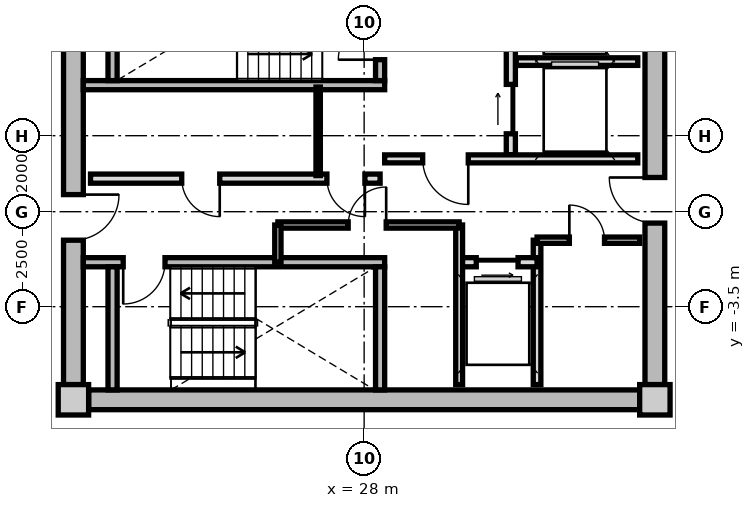
"""IFC4 building model, lengths in metres.
Left out: names, types, materials, properties, quantities, classifications, styles, units other than length and angle.
Written with IfcOpenShell. Run it as: python <this file> out.ifc"""

import sys

from ifc_helpers import new_model, si_unit, direction, frame, frame_2d, origin, origin_2d, place, context, subcontext, project, spatial, rectangle, extrude, source, transform, mapped, element, fill, save


model = new_model("IFC4")
c1 = context("Model", 3, precision=1e-05, world=origin(), true_north=direction((0.0, 1.0)))
c2 = subcontext(c1, "Body", "Model", "MODEL_VIEW")
j1 = project(units=[si_unit("LENGTHUNIT", "METRE"), si_unit("PLANEANGLEUNIT", "RADIAN")], contexts=[c1])
p1 = place(None, origin())
s1 = spatial("IfcSite", under=j1, at=p1, CompositionType="ELEMENT")
p2 = place(p1, origin())
s2 = spatial("IfcBuilding", under=s1, at=p2, CompositionType="ELEMENT")
p3 = place(p2, frame((0.0, 0.0, 196.75)))
s3 = spatial("IfcBuildingStorey", under=s2, at=p3, CompositionType="ELEMENT", Elevation=196.75)
m1 = source(origin(), c2, "Body", "SweptSolid", [
    extrude(rectangle(XDim=0.8, YDim=0.8, at=origin_2d()), origin(), (0.0, 0.0, 1.0), 3.05),
])
for number, where, z_axis, x_axis in (
    (1, (20.35, -5.95, 0.0), (0.0, 0.0, 1.0), (1.0, 0.0, 0.0)),
    (2, (35.65, -5.95, 0.0), (0.0, 0.0, 1.0), (1.0, 0.0, 0.0)),
):
    element("IfcColumn", number, at=place(p3, frame(where, z_axis=z_axis, x_axis=x_axis)), inside=s3, PredefinedType="COLUMN", context=c2, shape_type="MappedRepresentation", body=[
        mapped(m1, transform((0.0, 0.0, 0.0), x_axis=(1.0, 0.0, 0.0), y_axis=(0.0, 1.0, 0.0), z_axis=(0.0, 0.0, 1.0), scale=1.0)),
    ])
m2 = source(origin(), c2, "Body", "SweptSolid", [
    extrude(rectangle(XDim=14.5, YDim=0.52, at=frame_2d((7.25, 0.0))), origin(), (0.0, 0.0, 1.0), 2.76),
])
p4 = place(p3, frame((35.25, -5.95, 0.0), z_axis=(0.0, 0.0, 1.0), x_axis=(-1.0, 0.0, 0.0)))
e3 = element("IfcWall", 3, at=p4, inside=s3, PredefinedType="SHEAR", context=c2, shape_type="MappedRepresentation", body=[
    mapped(m2, transform((0.0, 0.0, 0.0), x_axis=(1.0, 0.0, 0.0), y_axis=(0.0, 1.0, 0.0), z_axis=(0.0, 0.0, 1.0), scale=1.0)),
])
m3 = source(origin(), c2, "Body", "SweptSolid", [
    extrude(rectangle(XDim=11.1, YDim=0.52, at=frame_2d((5.55, 0.0))), origin(), (0.0, 0.0, 1.0), 2.76),
])
p5 = place(p3, frame((20.35, -5.55, 0.0), z_axis=(0.0, 0.0, 1.0), x_axis=(0.0, 1.0, 0.0)))
e4 = element("IfcWall", 4, at=p5, inside=s3, PredefinedType="SHEAR", context=c2, shape_type="MappedRepresentation", body=[
    mapped(m3, transform((0.0, 0.0, 0.0), x_axis=(1.0, 0.0, 0.0), y_axis=(0.0, 1.0, 0.0), z_axis=(0.0, 0.0, 1.0), scale=1.0)),
])
p6 = place(p5, frame((3.8, 0.0, 0.0)))
e5 = element("IfcOpeningElement", 5, at=p6, cuts=e4, PredefinedType="OPENING", context=c2, shape_type="SweptSolid", body=[
    extrude(rectangle(XDim=1.2, YDim=2.15, at=frame_2d((0.6, 1.075))), frame((0.0, 0.27, 0.0), z_axis=(0.0, -1.0, 0.0), x_axis=(1.0, 0.0, 0.0)), (0.0, 0.0, 1.0), 0.54),
])
p7 = place(p3, frame((35.65, 5.55, 0.0), z_axis=(0.0, 0.0, 1.0), x_axis=(0.0, -1.0, 0.0)))
e6 = element("IfcWall", 6, at=p7, inside=s3, PredefinedType="SHEAR", context=c2, shape_type="MappedRepresentation", body=[
    mapped(m3, transform((0.0, 0.0, 0.0), x_axis=(1.0, 0.0, 0.0), y_axis=(0.0, 1.0, 0.0), z_axis=(0.0, 0.0, 1.0), scale=1.0)),
])
p8 = place(p7, frame((5.65, 0.0, 0.0)))
e7 = element("IfcOpeningElement", 7, at=p8, cuts=e6, PredefinedType="OPENING", context=c2, shape_type="SweptSolid", body=[
    extrude(rectangle(XDim=1.2, YDim=2.15, at=frame_2d((0.6, 1.075))), frame((0.0, 0.27, 0.0), z_axis=(0.0, -1.0, 0.0), x_axis=(1.0, 0.0, 0.0)), (0.0, 0.0, 1.0), 0.54),
])
m4 = source(origin(), c2, "Body", "SweptSolid", [
    extrude(rectangle(XDim=7.93, YDim=0.24, at=frame_2d((3.965, 0.0))), origin(), (0.0, 0.0, 1.0), 2.76),
])
p9 = place(p3, frame((20.61, 2.33, 0.0), z_axis=(0.0, 0.0, 1.0), x_axis=(1.0, 0.0, 0.0)))
e8 = element("IfcWall", 8, at=p9, inside=s3, PredefinedType="PARTITIONING", context=c2, shape_type="MappedRepresentation", body=[
    mapped(m4, transform((0.0, 0.0, 0.0), x_axis=(1.0, 0.0, 0.0), y_axis=(0.0, 1.0, 0.0), z_axis=(0.0, 0.0, 1.0), scale=1.0)),
])
m5 = source(origin(), c2, "Body", "SweptSolid", [
    extrude(rectangle(XDim=3.24, YDim=0.24, at=frame_2d((1.62, 0.0))), origin(), (0.0, 0.0, 1.0), 2.76),
])
p10 = place(p3, frame((21.38, 2.45, 0.0), z_axis=(0.0, 0.0, 1.0), x_axis=(0.0, 1.0, 0.0)))
e9 = element("IfcWall", 9, at=p10, inside=s3, PredefinedType="PARTITIONING", context=c2, shape_type="MappedRepresentation", body=[
    mapped(m5, transform((0.0, 0.0, 0.0), x_axis=(1.0, 0.0, 0.0), y_axis=(0.0, 1.0, 0.0), z_axis=(0.0, 0.0, 1.0), scale=1.0)),
])
p11 = place(p3, frame((28.42, 2.45, 0.0), z_axis=(0.0, 0.0, 1.0), x_axis=(0.0, 1.0, 0.0)))
e10 = element("IfcWall", 10, at=p11, inside=s3, PredefinedType="PARTITIONING", context=c2, shape_type="MappedRepresentation", body=[
    mapped(m5, transform((0.0, 0.0, 0.0), x_axis=(1.0, 0.0, 0.0), y_axis=(0.0, 1.0, 0.0), z_axis=(0.0, 0.0, 1.0), scale=1.0)),
])
p12 = place(p11, frame((0.55, 0.0, 0.0)))
e11 = element("IfcOpeningElement", 11, at=p12, cuts=e10, PredefinedType="OPENING", context=c2, shape_type="SweptSolid", body=[
    extrude(rectangle(XDim=1.1, YDim=2.15, at=frame_2d((0.55, 1.075))), frame((0.0, 0.13, 0.0), z_axis=(0.0, -1.0, 0.0), x_axis=(1.0, 0.0, 0.0)), (0.0, 0.0, 1.0), 0.26),
])
p13 = place(p3, frame((20.61, -2.33, 0.0), z_axis=(0.0, 0.0, 1.0), x_axis=(1.0, 0.0, 0.0)))
e12 = element("IfcWall", 12, at=p13, inside=s3, PredefinedType="PARTITIONING", context=c2, shape_type="MappedRepresentation", body=[
    mapped(m4, transform((0.0, 0.0, 0.0), x_axis=(1.0, 0.0, 0.0), y_axis=(0.0, 1.0, 0.0), z_axis=(0.0, 0.0, 1.0), scale=1.0)),
])
p14 = place(p13, frame((1.05, 0.0, 0.0)))
e13 = element("IfcOpeningElement", 13, at=p14, cuts=e12, PredefinedType="OPENING", context=c2, shape_type="SweptSolid", body=[
    extrude(rectangle(XDim=1.1, YDim=2.15, at=frame_2d((0.55, 1.075))), frame((0.0, 0.13, 0.0), z_axis=(0.0, -1.0, 0.0), x_axis=(1.0, 0.0, 0.0)), (0.0, 0.0, 1.0), 0.26),
])
for number, where, z_axis, x_axis in (
    (14, (21.38, -5.69, 0.0), (0.0, 0.0, 1.0), (0.0, 1.0, 0.0)),
    (15, (28.42, -5.69, 0.0), (0.0, 0.0, 1.0), (0.0, 1.0, 0.0)),
):
    element("IfcWall", number, at=place(p3, frame(where, z_axis=z_axis, x_axis=x_axis)), inside=s3, PredefinedType="PARTITIONING", context=c2, shape_type="MappedRepresentation", body=[
        mapped(m5, transform((0.0, 0.0, 0.0), x_axis=(1.0, 0.0, 0.0), y_axis=(0.0, 1.0, 0.0), z_axis=(0.0, 0.0, 1.0), scale=1.0)),
    ])
m6 = source(origin(), c2, "Body", "SweptSolid", [
    extrude(rectangle(XDim=5.0, YDim=0.24, at=frame_2d((2.5, 0.0))), origin(), (0.0, 0.0, 1.0), 2.745),
])
p15 = place(p3, frame((31.86, 0.5, 0.0), z_axis=(0.0, 0.0, 1.0), x_axis=(0.0, 1.0, 0.0)))
e16 = element("IfcWall", 16, at=p15, inside=s3, PredefinedType="PARTITIONING", context=c2, shape_type="MappedRepresentation", body=[
    mapped(m6, transform((0.0, 0.0, 0.0), x_axis=(1.0, 0.0, 0.0), y_axis=(0.0, 1.0, 0.0), z_axis=(0.0, 0.0, 1.0), scale=1.0)),
])
p16 = place(p15, frame((3.05, 0.0, 0.0)))
e17 = element("IfcOpeningElement", 17, at=p16, cuts=e16, PredefinedType="OPENING", context=c2, shape_type="SweptSolid", body=[
    extrude(rectangle(XDim=1.3, YDim=2.2, at=frame_2d((0.65, 1.1))), frame((0.0, 0.13, 0.0), z_axis=(0.0, -1.0, 0.0), x_axis=(1.0, 0.0, 0.0)), (0.0, 0.0, 1.0), 0.26),
])
p17 = place(p15, frame((0.55, 0.0, 0.0)))
e18 = element("IfcOpeningElement", 18, at=p17, cuts=e16, PredefinedType="OPENING", context=c2, shape_type="SweptSolid", body=[
    extrude(rectangle(XDim=1.3, YDim=2.2, at=frame_2d((0.65, 1.1))), frame((0.0, 0.13, 0.0), z_axis=(0.0, -1.0, 0.0), x_axis=(1.0, 0.0, 0.0)), (0.0, 0.0, 1.0), 0.26),
])
m7 = source(origin(), c2, "Body", "SweptSolid", [
    extrude(rectangle(XDim=3.2, YDim=0.2, at=frame_2d((1.6, 0.0))), origin(), (0.0, 0.0, 1.0), 2.745),
])
p18 = place(p3, frame((32.0, 2.95, 0.0), z_axis=(0.0, 0.0, 1.0), x_axis=(1.0, 0.0, 0.0)))
e19 = element("IfcWall", 19, at=p18, inside=s3, PredefinedType="PARTITIONING", context=c2, shape_type="MappedRepresentation", body=[
    mapped(m7, transform((0.0, 0.0, 0.0), x_axis=(1.0, 0.0, 0.0), y_axis=(0.0, 1.0, 0.0), z_axis=(0.0, 0.0, 1.0), scale=1.0)),
])
m8 = source(origin(), c2, "Body", "SweptSolid", [
    extrude(rectangle(XDim=6.66, YDim=0.21, at=frame_2d((3.33, 0.0))), origin(), (0.0, 0.0, 1.0), 2.745),
])
p19 = place(p3, frame((28.54, 0.39, 0.0), z_axis=(0.0, 0.0, 1.0), x_axis=(1.0, 0.0, 0.0)))
e20 = element("IfcWall", 20, at=p19, inside=s3, PredefinedType="PARTITIONING", context=c2, shape_type="MappedRepresentation", body=[
    mapped(m8, transform((0.0, 0.0, 0.0), x_axis=(1.0, 0.0, 0.0), y_axis=(0.0, 1.0, 0.0), z_axis=(0.0, 0.0, 1.0), scale=1.0)),
])
p20 = place(p19, frame((1.0, 0.0, 0.0)))
e21 = element("IfcOpeningElement", 21, at=p20, cuts=e20, PredefinedType="OPENING", context=c2, shape_type="SweptSolid", body=[
    extrude(rectangle(XDim=1.2, YDim=2.15, at=frame_2d((0.6, 1.075))), frame((0.0, 0.115, 0.0), z_axis=(0.0, -1.0, 0.0), x_axis=(1.0, 0.0, 0.0)), (0.0, 0.0, 1.0), 0.23),
])
m9 = source(origin(), c2, "Body", "SweptSolid", [
    extrude(rectangle(XDim=7.62, YDim=0.24, at=frame_2d((3.81, 0.0))), origin(), (0.0, 0.0, 1.0), 2.745),
])
p21 = place(p3, frame((20.8, -0.13, 0.0), z_axis=(0.0, 0.0, 1.0), x_axis=(1.0, 0.0, 0.0)))
e22 = element("IfcWall", 22, at=p21, inside=s3, PredefinedType="PARTITIONING", context=c2, shape_type="MappedRepresentation", body=[
    mapped(m9, transform((0.0, 0.0, 0.0), x_axis=(1.0, 0.0, 0.0), y_axis=(0.0, 1.0, 0.0), z_axis=(0.0, 0.0, 1.0), scale=1.0)),
])
p22 = place(p21, frame((6.22, 0.0, 0.0)))
e23 = element("IfcOpeningElement", 23, at=p22, cuts=e22, PredefinedType="OPENING", context=c2, shape_type="SweptSolid", body=[
    extrude(rectangle(XDim=1.0, YDim=2.1, at=frame_2d((0.5, 1.05))), frame((0.0, 0.13, 0.0), z_axis=(0.0, -1.0, 0.0), x_axis=(1.0, 0.0, 0.0)), (0.0, 0.0, 1.0), 0.26),
])
p23 = place(p21, frame((2.4, 0.0, 0.0)))
e24 = element("IfcOpeningElement", 24, at=p23, cuts=e22, PredefinedType="OPENING", context=c2, shape_type="SweptSolid", body=[
    extrude(rectangle(XDim=1.0, YDim=2.1, at=frame_2d((0.5, 1.05))), frame((0.0, 0.13, 0.0), z_axis=(0.0, -1.0, 0.0), x_axis=(1.0, 0.0, 0.0)), (0.0, 0.0, 1.0), 0.26),
])
m10 = source(origin(), c2, "Body", "SweptSolid", [
    extrude(rectangle(XDim=2.33, YDim=0.115, at=frame_2d((1.165, 0.0))), origin(), (0.0, 0.0, 1.0), 2.745),
])
p24 = place(p3, frame((26.79, -0.05, 0.0), z_axis=(0.0, 0.0, 1.0), x_axis=(0.0, 1.0, 0.0)))
e25 = element("IfcWall", 25, at=p24, inside=s3, PredefinedType="PARTITIONING", context=c2, shape_type="MappedRepresentation", body=[
    mapped(m10, transform((0.0, 0.0, 0.0), x_axis=(1.0, 0.0, 0.0), y_axis=(0.0, 1.0, 0.0), z_axis=(0.0, 0.0, 1.0), scale=1.0)),
])
m11 = source(origin(), c2, "Body", "SweptSolid", [
    extrude(rectangle(XDim=3.8, YDim=0.2, at=frame_2d((1.9, 0.0))), origin(), (0.0, 0.0, 1.0), 2.745),
])
p25 = place(p3, frame((32.55, -5.55, 0.0), z_axis=(0.0, 0.0, 1.0), x_axis=(0.0, 1.0, 0.0)))
e26 = element("IfcWall", 26, at=p25, inside=s3, PredefinedType="PARTITIONING", context=c2, shape_type="MappedRepresentation", body=[
    mapped(m11, transform((0.0, 0.0, 0.0), x_axis=(1.0, 0.0, 0.0), y_axis=(0.0, 1.0, 0.0), z_axis=(0.0, 0.0, 1.0), scale=1.0)),
])
m12 = source(origin(), c2, "Body", "SweptSolid", [
    extrude(rectangle(XDim=2.05, YDim=0.24, at=frame_2d((1.025, 0.0))), origin(), (0.0, 0.0, 1.0), 2.745),
])
p26 = place(p3, frame((30.5, -2.33, 0.0), z_axis=(0.0, 0.0, 1.0), x_axis=(1.0, 0.0, 0.0)))
e27 = element("IfcWall", 27, at=p26, inside=s3, PredefinedType="PARTITIONING", context=c2, shape_type="MappedRepresentation", body=[
    mapped(m12, transform((0.0, 0.0, 0.0), x_axis=(1.0, 0.0, 0.0), y_axis=(0.0, 1.0, 0.0), z_axis=(0.0, 0.0, 1.0), scale=1.0)),
])
p27 = place(p26, frame((0.45, 0.0, 0.0)))
e28 = element("IfcOpeningElement", 28, at=p27, cuts=e27, PredefinedType="OPENING", context=c2, shape_type="SweptSolid", body=[
    extrude(rectangle(XDim=1.1, YDim=2.2, at=frame_2d((0.55, 1.1))), frame((0.0, 0.13, 0.0), z_axis=(0.0, -1.0, 0.0), x_axis=(1.0, 0.0, 0.0)), (0.0, 0.0, 1.0), 0.26),
])
m13 = source(origin(), c2, "Body", "SweptSolid", [
    extrude(rectangle(XDim=4.2, YDim=0.18, at=frame_2d((2.1, 0.0))), origin(), (0.0, 0.0, 1.0), 2.745),
])
p28 = place(p3, frame((30.5, -5.55, 0.0), z_axis=(0.0, 0.0, 1.0), x_axis=(0.0, 1.0, 0.0)))
e29 = element("IfcWall", 29, at=p28, inside=s3, PredefinedType="PARTITIONING", context=c2, shape_type="MappedRepresentation", body=[
    mapped(m13, transform((0.0, 0.0, 0.0), x_axis=(1.0, 0.0, 0.0), y_axis=(0.0, 1.0, 0.0), z_axis=(0.0, 0.0, 1.0), scale=1.0)),
])
m14 = source(origin(), c2, "Body", "SweptSolid", [
    extrude(rectangle(XDim=4.77, YDim=0.165, at=frame_2d((2.385, 0.0))), origin(), (0.0, 0.0, 1.0), 2.745),
])
p29 = place(p3, frame((25.73, -1.35, 0.0), z_axis=(0.0, 0.0, 1.0), x_axis=(1.0, 0.0, 0.0)))
e30 = element("IfcWall", 30, at=p29, inside=s3, PredefinedType="PARTITIONING", context=c2, shape_type="MappedRepresentation", body=[
    mapped(m14, transform((0.0, 0.0, 0.0), x_axis=(1.0, 0.0, 0.0), y_axis=(0.0, 1.0, 0.0), z_axis=(0.0, 0.0, 1.0), scale=1.0)),
])
p30 = place(p29, frame((1.85, 0.0, 0.0)))
e31 = element("IfcOpeningElement", 31, at=p30, cuts=e30, PredefinedType="OPENING", context=c2, shape_type="SweptSolid", body=[
    extrude(rectangle(XDim=1.0, YDim=2.1, at=frame_2d((0.5, 1.05))), frame((0.0, 0.093, 0.0), z_axis=(0.0, -1.0, 0.0), x_axis=(1.0, 0.0, 0.0)), (0.0, 0.0, 1.0), 0.185),
])
m15 = source(origin(), c2, "Body", "SweptSolid", [
    extrude(rectangle(XDim=0.98, YDim=0.165, at=frame_2d((0.49, 0.0))), origin(), (0.0, 0.0, 1.0), 2.745),
])
p31 = place(p3, frame((25.73, -2.33, 0.0), z_axis=(0.0, 0.0, 1.0), x_axis=(0.0, 1.0, 0.0)))
e32 = element("IfcWall", 32, at=p31, inside=s3, PredefinedType="PARTITIONING", context=c2, shape_type="MappedRepresentation", body=[
    mapped(m15, transform((0.0, 0.0, 0.0), x_axis=(1.0, 0.0, 0.0), y_axis=(0.0, 1.0, 0.0), z_axis=(0.0, 0.0, 1.0), scale=1.0)),
])
m16 = source(origin(), c2, "Body", "SweptSolid", [
    extrude(rectangle(XDim=2.7, YDim=0.165, at=frame_2d((1.35, 0.0))), origin(), (0.0, 0.0, 1.0), 2.745),
])
p32 = place(p3, frame((32.55, -1.75, 0.0), z_axis=(0.0, 0.0, 1.0), x_axis=(1.0, 0.0, 0.0)))
e33 = element("IfcWall", 33, at=p32, inside=s3, PredefinedType="PARTITIONING", context=c2, shape_type="MappedRepresentation", body=[
    mapped(m16, transform((0.0, 0.0, 0.0), x_axis=(1.0, 0.0, 0.0), y_axis=(0.0, 1.0, 0.0), z_axis=(0.0, 0.0, 1.0), scale=1.0)),
])
p33 = place(p32, frame((0.85, 0.0, 0.0)))
e34 = element("IfcOpeningElement", 34, at=p33, cuts=e33, PredefinedType="OPENING", context=c2, shape_type="SweptSolid", body=[
    extrude(rectangle(XDim=0.925, YDim=2.1, at=frame_2d((0.462, 1.05))), frame((0.0, 0.093, 0.0), z_axis=(0.0, -1.0, 0.0), x_axis=(1.0, 0.0, 0.0)), (0.0, 0.0, 1.0), 0.185),
])
m17 = source(origin(), c2, "Body", "SweptSolid", [
    extrude(rectangle(XDim=1.1, YDim=2.15, at=frame_2d((0.55, 1.075))), frame((0.0, 0.025, 0.0), z_axis=(0.0, -1.0, 0.0), x_axis=(1.0, 0.0, 0.0)), (0.0, 0.0, 1.0), 0.05),
])
p34 = place(p12, origin())
e35 = element("IfcDoor", 35, at=p34, inside=s3, OperationType="SINGLE_SWING_LEFT", PredefinedType="DOOR", context=c2, shape_type="MappedRepresentation", body=[
    mapped(m17, transform((0.0, 0.0, 0.0), x_axis=(1.0, 0.0, 0.0), y_axis=(0.0, 1.0, 0.0), z_axis=(0.0, 0.0, 1.0), scale=1.0)),
])
fill(e11, e35)
p35 = place(p14, frame((1.1, 0.0, 0.0), z_axis=(0.0, 0.0, 1.0), x_axis=(-1.0, 0.0, 0.0)))
e36 = element("IfcDoor", 36, at=p35, inside=s3, OperationType="SINGLE_SWING_RIGHT", PredefinedType="DOOR", context=c2, shape_type="MappedRepresentation", body=[
    mapped(m17, transform((0.0, 0.0, 0.0), x_axis=(1.0, 0.0, 0.0), y_axis=(0.0, 1.0, 0.0), z_axis=(0.0, 0.0, 1.0), scale=1.0)),
])
fill(e13, e36)
m18 = source(origin(), c2, "Body", "SweptSolid", [
    extrude(rectangle(XDim=1.3, YDim=2.2, at=frame_2d((0.65, 1.1))), frame((0.0, 0.025, 0.0), z_axis=(0.0, -1.0, 0.0), x_axis=(1.0, 0.0, 0.0)), (0.0, 0.0, 1.0), 0.05),
])
p36 = place(p17, origin())
e37 = element("IfcDoor", 37, at=p36, inside=s3, OperationType="SLIDING_TO_RIGHT", PredefinedType="DOOR", context=c2, shape_type="MappedRepresentation", body=[
    mapped(m18, transform((0.0, 0.0, 0.0), x_axis=(1.0, 0.0, 0.0), y_axis=(0.0, 1.0, 0.0), z_axis=(0.0, 0.0, 1.0), scale=1.0)),
])
fill(e18, e37)
m19 = source(origin(), c2, "Body", "SweptSolid", [
    extrude(rectangle(XDim=1.2, YDim=2.15, at=frame_2d((0.6, 1.075))), frame((0.0, 0.025, 0.0), z_axis=(0.0, -1.0, 0.0), x_axis=(1.0, 0.0, 0.0)), (0.0, 0.0, 1.0), 0.05),
])
p37 = place(p20, frame((1.2, 0.0, 0.0), z_axis=(0.0, 0.0, 1.0), x_axis=(-1.0, 0.0, 0.0)))
e38 = element("IfcDoor", 38, at=p37, inside=s3, OperationType="SINGLE_SWING_LEFT", PredefinedType="DOOR", context=c2, shape_type="MappedRepresentation", body=[
    mapped(m19, transform((0.0, 0.0, 0.0), x_axis=(1.0, 0.0, 0.0), y_axis=(0.0, 1.0, 0.0), z_axis=(0.0, 0.0, 1.0), scale=1.0)),
])
fill(e21, e38)
p38 = place(p6, frame((1.2, 0.0, 0.0), z_axis=(0.0, 0.0, 1.0), x_axis=(-1.0, 0.0, 0.0)))
e39 = element("IfcDoor", 39, at=p38, inside=s3, OperationType="SINGLE_SWING_LEFT", PredefinedType="DOOR", context=c2, shape_type="MappedRepresentation", body=[
    mapped(m19, transform((0.0, 0.0, 0.0), x_axis=(1.0, 0.0, 0.0), y_axis=(0.0, 1.0, 0.0), z_axis=(0.0, 0.0, 1.0), scale=1.0)),
])
fill(e5, e39)
p39 = place(p8, frame((1.2, 0.0, 0.0), z_axis=(0.0, 0.0, 1.0), x_axis=(-1.0, 0.0, 0.0)))
e40 = element("IfcDoor", 40, at=p39, inside=s3, OperationType="SINGLE_SWING_RIGHT", PredefinedType="DOOR", context=c2, shape_type="MappedRepresentation", body=[
    mapped(m19, transform((0.0, 0.0, 0.0), x_axis=(1.0, 0.0, 0.0), y_axis=(0.0, 1.0, 0.0), z_axis=(0.0, 0.0, 1.0), scale=1.0)),
])
fill(e7, e40)
m20 = source(origin(), c2, "Body", "SweptSolid", [
    extrude(rectangle(XDim=1.0, YDim=2.1, at=frame_2d((0.5, 1.05))), frame((0.0, 0.025, 0.0), z_axis=(0.0, -1.0, 0.0), x_axis=(1.0, 0.0, 0.0)), (0.0, 0.0, 1.0), 0.05),
])
p40 = place(p22, frame((1.0, 0.0, 0.0), z_axis=(0.0, 0.0, 1.0), x_axis=(-1.0, 0.0, 0.0)))
e41 = element("IfcDoor", 41, at=p40, inside=s3, OperationType="SINGLE_SWING_LEFT", PredefinedType="DOOR", context=c2, shape_type="MappedRepresentation", body=[
    mapped(m20, transform((0.0, 0.0, 0.0), x_axis=(1.0, 0.0, 0.0), y_axis=(0.0, 1.0, 0.0), z_axis=(0.0, 0.0, 1.0), scale=1.0)),
])
fill(e23, e41)
p41 = place(p23, frame((1.0, 0.0, 0.0), z_axis=(0.0, 0.0, 1.0), x_axis=(-1.0, 0.0, 0.0)))
e42 = element("IfcDoor", 42, at=p41, inside=s3, OperationType="SINGLE_SWING_LEFT", PredefinedType="DOOR", context=c2, shape_type="MappedRepresentation", body=[
    mapped(m20, transform((0.0, 0.0, 0.0), x_axis=(1.0, 0.0, 0.0), y_axis=(0.0, 1.0, 0.0), z_axis=(0.0, 0.0, 1.0), scale=1.0)),
])
fill(e24, e42)
m21 = source(origin(), c2, "Body", "SweptSolid", [
    extrude(rectangle(XDim=1.1, YDim=2.2, at=frame_2d((0.55, 1.1))), frame((0.0, 0.025, 0.0), z_axis=(0.0, -1.0, 0.0), x_axis=(1.0, 0.0, 0.0)), (0.0, 0.0, 1.0), 0.05),
])
p42 = place(p27, frame((1.1, 0.0, 0.0), z_axis=(0.0, 0.0, 1.0), x_axis=(-1.0, 0.0, 0.0)))
e43 = element("IfcDoor", 43, at=p42, inside=s3, OperationType="SLIDING_TO_RIGHT", PredefinedType="DOOR", context=c2, shape_type="MappedRepresentation", body=[
    mapped(m21, transform((0.0, 0.0, 0.0), x_axis=(1.0, 0.0, 0.0), y_axis=(0.0, 1.0, 0.0), z_axis=(0.0, 0.0, 1.0), scale=1.0)),
])
fill(e28, e43)
p43 = place(p30, origin())
e44 = element("IfcDoor", 44, at=p43, inside=s3, OperationType="SINGLE_SWING_RIGHT", PredefinedType="DOOR", context=c2, shape_type="MappedRepresentation", body=[
    mapped(m20, transform((0.0, 0.0, 0.0), x_axis=(1.0, 0.0, 0.0), y_axis=(0.0, 1.0, 0.0), z_axis=(0.0, 0.0, 1.0), scale=1.0)),
])
fill(e31, e44)
m22 = source(origin(), c2, "Body", "SweptSolid", [
    extrude(rectangle(XDim=0.925, YDim=2.1, at=frame_2d((0.462, 1.05))), frame((0.0, 0.025, 0.0), z_axis=(0.0, -1.0, 0.0), x_axis=(1.0, 0.0, 0.0)), (0.0, 0.0, 1.0), 0.05),
])
p44 = place(p33, origin())
e45 = element("IfcDoor", 45, at=p44, inside=s3, OperationType="SINGLE_SWING_LEFT", PredefinedType="DOOR", context=c2, shape_type="MappedRepresentation", body=[
    mapped(m22, transform((0.0, 0.0, 0.0), x_axis=(1.0, 0.0, 0.0), y_axis=(0.0, 1.0, 0.0), z_axis=(0.0, 0.0, 1.0), scale=1.0)),
])
fill(e34, e45)
save(model, sys.argv[1])
